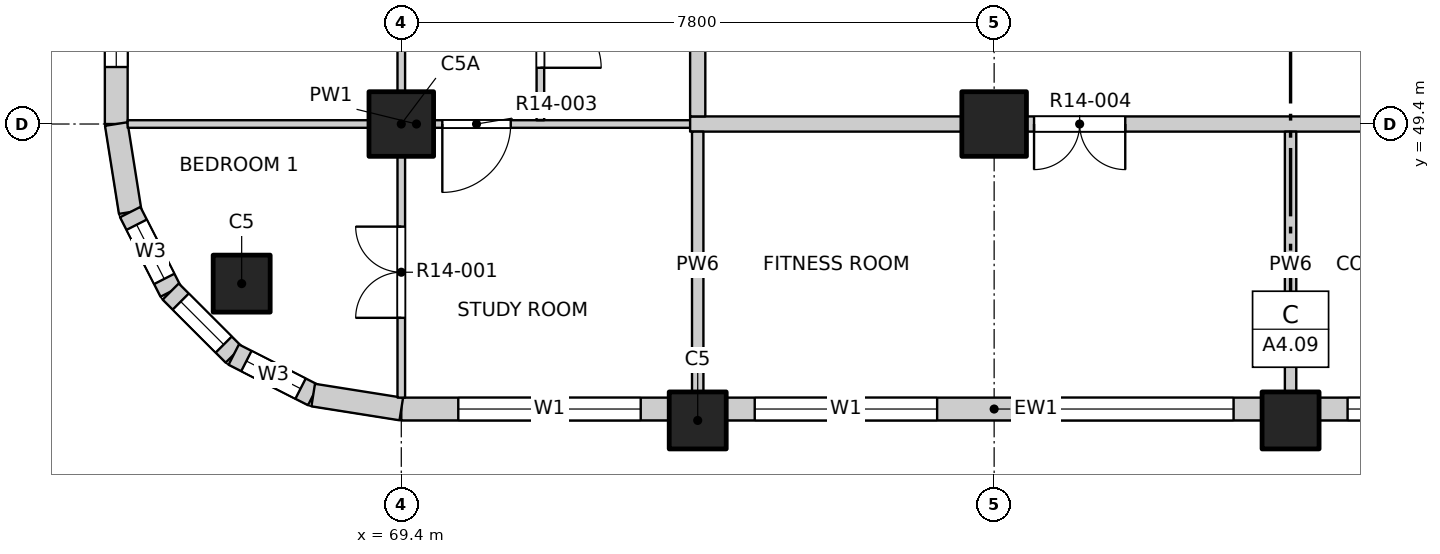
"""IFC4 building model, lengths in metres.
Left out: names, types, materials, properties, quantities, classifications, styles, units other than length and angle.
Written with IfcOpenShell. Run it as: python <this file> out.ifc"""

import sys

from ifc_helpers import new_model, si_unit, direction, frame, frame_2d, origin, origin_2d, place, context, subcontext, project, spatial, rectangle, extrude, element, fill, save


model = new_model("IFC4")
c1 = context("Model", 3, precision=1e-05, world=origin(), true_north=direction((0.0, 1.0)))
c2 = subcontext(c1, "Body", "Model", "MODEL_VIEW")
j1 = project(units=[si_unit("LENGTHUNIT", "METRE"), si_unit("PLANEANGLEUNIT", "RADIAN")], contexts=[c1])
p1 = place(None, origin())
s1 = spatial("IfcSite", under=j1, at=p1, CompositionType="ELEMENT")
p2 = place(p1, origin())
s2 = spatial("IfcBuilding", under=s1, at=p2, CompositionType="ELEMENT")
p3 = place(p2, frame((0.0, 0.0, 152.0)))
s3 = spatial("IfcBuildingStorey", under=s2, at=p3, CompositionType="ELEMENT", Elevation=152.0)
for number, where, z_axis, x_axis in (
    (1, (67.3, 47.3, -0.25), (0.0, 0.0, 1.0), (1.0, 0.0, 0.0)),
    (2, (73.3, 45.5, -0.25), (0.0, 0.0, 1.0), (1.0, 0.0, 0.0)),
    (3, (81.1, 45.5, -0.25), (0.0, 0.0, 1.0), (1.0, 0.0, 0.0)),
):
    element("IfcColumn", number, at=place(p3, frame(where, z_axis=z_axis, x_axis=x_axis)), inside=s3, PredefinedType="COLUMN", context=c2, shape_type="SweptSolid", body=[
        extrude(rectangle(XDim=0.75, YDim=0.75, at=origin_2d()), origin(), (0.0, 0.0, 1.0), 3.4),
    ])
for number, where, z_axis, x_axis in (
    (4, (69.4, 49.4, -0.25), (0.0, 0.0, 1.0), (1.0, 0.0, 0.0)),
    (5, (77.2, 49.4, -0.25), (0.0, 0.0, 1.0), (1.0, 0.0, 0.0)),
):
    element("IfcColumn", number, at=place(p3, frame(where, z_axis=z_axis, x_axis=x_axis)), inside=s3, PredefinedType="COLUMN", context=c2, shape_type="SweptSolid", body=[
        extrude(rectangle(XDim=0.85, YDim=0.85, at=origin_2d()), origin(), (0.0, 0.0, 1.0), 3.4),
    ])
p4 = place(p3, frame((69.4, 45.65, 0.0), z_axis=(0.0, 0.0, 1.0), x_axis=(1.0, 0.0, 0.0)))
e6 = element("IfcWall", 6, at=p4, inside=s3, PredefinedType="SOLIDWALL", context=c2, shape_type="SweptSolid", body=[
    extrude(rectangle(XDim=3.525, YDim=0.3, at=frame_2d((1.763, 0.0))), origin(), (0.0, 0.0, 1.0), 2.7),
])
p5 = place(p4, frame((0.75, 0.0, 0.9)))
e7 = element("IfcOpeningElement", 7, at=p5, cuts=e6, PredefinedType="OPENING", context=c2, shape_type="SweptSolid", body=[
    extrude(rectangle(XDim=2.4, YDim=1.8, at=frame_2d((1.2, 0.9))), frame((0.0, 0.16, 0.0), z_axis=(0.0, -1.0, 0.0), x_axis=(1.0, 0.0, 0.0)), (0.0, 0.0, 1.0), 0.32),
])
p6 = place(p3, frame((73.675, 45.65, 0.0), z_axis=(0.0, 0.0, 1.0), x_axis=(1.0, 0.0, 0.0)))
e8 = element("IfcWall", 8, at=p6, inside=s3, PredefinedType="SOLIDWALL", context=c2, shape_type="SweptSolid", body=[
    extrude(rectangle(XDim=7.05, YDim=0.3, at=frame_2d((3.525, 0.0))), origin(), (0.0, 0.0, 1.0), 2.7),
])
p7 = place(p6, frame((0.375, 0.0, 0.9)))
e9 = element("IfcOpeningElement", 9, at=p7, cuts=e8, PredefinedType="OPENING", context=c2, shape_type="SweptSolid", body=[
    extrude(rectangle(XDim=2.4, YDim=1.8, at=frame_2d((1.2, 0.9))), frame((0.0, 0.16, 0.0), z_axis=(0.0, -1.0, 0.0), x_axis=(1.0, 0.0, 0.0)), (0.0, 0.0, 1.0), 0.32),
])
p8 = place(p6, frame((4.275, 0.0, 0.9)))
e10 = element("IfcOpeningElement", 10, at=p8, cuts=e8, PredefinedType="OPENING", context=c2, shape_type="SweptSolid", body=[
    extrude(rectangle(XDim=2.4, YDim=1.8, at=frame_2d((1.2, 0.9))), frame((0.0, 0.16, 0.0), z_axis=(0.0, -1.0, 0.0), x_axis=(1.0, 0.0, 0.0)), (0.0, 0.0, 1.0), 0.32),
])
p9 = place(p3, frame((81.475, 45.65, 0.0), z_axis=(0.0, 0.0, 1.0), x_axis=(1.0, 0.0, 0.0)))
e11 = element("IfcWall", 11, at=p9, inside=s3, PredefinedType="SOLIDWALL", context=c2, shape_type="SweptSolid", body=[
    extrude(rectangle(XDim=7.05, YDim=0.3, at=frame_2d((3.525, 0.0))), origin(), (0.0, 0.0, 1.0), 2.7),
])
p10 = place(p9, frame((0.375, 0.0, 0.9)))
e12 = element("IfcOpeningElement", 12, at=p10, cuts=e11, PredefinedType="OPENING", context=c2, shape_type="SweptSolid", body=[
    extrude(rectangle(XDim=2.4, YDim=1.8, at=frame_2d((1.2, 0.9))), frame((0.0, 0.16, 0.0), z_axis=(0.0, -1.0, 0.0), x_axis=(1.0, 0.0, 0.0)), (0.0, 0.0, 1.0), 0.32),
])
p11 = place(p9, frame((4.275, 0.0, 0.9)))
e13 = element("IfcOpeningElement", 13, at=p11, cuts=e11, PredefinedType="OPENING", context=c2, shape_type="SweptSolid", body=[
    extrude(rectangle(XDim=2.4, YDim=1.8, at=frame_2d((1.2, 0.9))), frame((0.0, 0.16, 0.0), z_axis=(0.0, -1.0, 0.0), x_axis=(1.0, 0.0, 0.0)), (0.0, 0.0, 1.0), 0.32),
])
p12 = place(p3, frame((65.65, 49.4, 0.0), z_axis=(0.0, 0.0, 1.0), x_axis=(0.0, 1.0, 0.0)))
e14 = element("IfcWall", 14, at=p12, inside=s3, PredefinedType="SOLIDWALL", context=c2, shape_type="SweptSolid", body=[
    extrude(rectangle(XDim=3.525, YDim=0.3, at=frame_2d((1.763, 0.0))), origin(), (0.0, 0.0, 1.0), 2.7),
])
p13 = place(p12, frame((0.75, 0.0, 0.9)))
e15 = element("IfcOpeningElement", 15, at=p13, cuts=e14, PredefinedType="OPENING", context=c2, shape_type="SweptSolid", body=[
    extrude(rectangle(XDim=2.4, YDim=1.8, at=frame_2d((1.2, 0.9))), frame((0.0, 0.16, 0.0), z_axis=(0.0, -1.0, 0.0), x_axis=(1.0, 0.0, 0.0)), (0.0, 0.0, 1.0), 0.32),
])
p14 = place(p3, frame((65.65, 49.4, 0.0), z_axis=(0.0, 0.0, 1.0), x_axis=(0.156496880861, -0.987678452879, 0.0)))
e16 = element("IfcWall", 16, at=p14, inside=s3, PredefinedType="SOLIDWALL", context=c2, shape_type="SweptSolid", body=[
    extrude(rectangle(XDim=1.173, YDim=0.3, at=frame_2d((0.586, 0.0))), origin(), (0.0, 0.0, 1.0), 2.7),
])
p15 = place(p3, frame((65.833, 48.241, 0.0), z_axis=(0.0, 0.0, 1.0), x_axis=(0.454025524128, -0.890988677504, 0.0)))
e17 = element("IfcWall", 17, at=p15, inside=s3, PredefinedType="SOLIDWALL", context=c2, shape_type="SweptSolid", body=[
    extrude(rectangle(XDim=1.173, YDim=0.3, at=frame_2d((0.587, 0.0))), origin(), (0.0, 0.0, 1.0), 2.7),
])
p16 = place(p15, frame((0.187, 0.0, 0.9)))
e18 = element("IfcOpeningElement", 18, at=p16, cuts=e17, PredefinedType="OPENING", context=c2, shape_type="SweptSolid", body=[
    extrude(rectangle(XDim=0.8, YDim=1.2, at=frame_2d((0.4, 0.6))), frame((0.0, 0.16, 0.0), z_axis=(0.0, -1.0, 0.0), x_axis=(1.0, 0.0, 0.0)), (0.0, 0.0, 1.0), 0.32),
])
p17 = place(p3, frame((66.366, 47.196, 0.0), z_axis=(0.0, 0.0, 1.0), x_axis=(0.707106781187, -0.707106781187, 0.0)))
e19 = element("IfcWall", 19, at=p17, inside=s3, PredefinedType="SOLIDWALL", context=c2, shape_type="SweptSolid", body=[
    extrude(rectangle(XDim=1.173, YDim=0.3, at=frame_2d((0.586, 0.0))), origin(), (0.0, 0.0, 1.0), 2.7),
])
p18 = place(p17, frame((0.187, 0.0, 0.9)))
e20 = element("IfcOpeningElement", 20, at=p18, cuts=e19, PredefinedType="OPENING", context=c2, shape_type="SweptSolid", body=[
    extrude(rectangle(XDim=0.8, YDim=1.2, at=frame_2d((0.4, 0.6))), frame((0.0, 0.16, 0.0), z_axis=(0.0, -1.0, 0.0), x_axis=(1.0, 0.0, 0.0)), (0.0, 0.0, 1.0), 0.32),
])
p19 = place(p3, frame((67.196, 46.366, 0.0), z_axis=(0.0, 0.0, 1.0), x_axis=(0.890988677504, -0.454025524128, 0.0)))
e21 = element("IfcWall", 21, at=p19, inside=s3, PredefinedType="SOLIDWALL", context=c2, shape_type="SweptSolid", body=[
    extrude(rectangle(XDim=1.173, YDim=0.3, at=frame_2d((0.587, 0.0))), origin(), (0.0, 0.0, 1.0), 2.7),
])
p20 = place(p19, frame((0.187, 0.0, 0.9)))
e22 = element("IfcOpeningElement", 22, at=p20, cuts=e21, PredefinedType="OPENING", context=c2, shape_type="SweptSolid", body=[
    extrude(rectangle(XDim=0.8, YDim=1.2, at=frame_2d((0.4, 0.6))), frame((0.0, 0.16, 0.0), z_axis=(0.0, -1.0, 0.0), x_axis=(1.0, 0.0, 0.0)), (0.0, 0.0, 1.0), 0.32),
])
p21 = place(p3, frame((68.241, 45.833, 0.0), z_axis=(0.0, 0.0, 1.0), x_axis=(0.987678452879, -0.156496880861, 0.0)))
e23 = element("IfcWall", 23, at=p21, inside=s3, PredefinedType="SOLIDWALL", context=c2, shape_type="SweptSolid", body=[
    extrude(rectangle(XDim=1.173, YDim=0.3, at=frame_2d((0.586, 0.0))), origin(), (0.0, 0.0, 1.0), 2.7),
])
p22 = place(p3, frame((65.8, 49.4, 0.0), z_axis=(0.0, 0.0, 1.0), x_axis=(1.0, 0.0, 0.0)))
e24 = element("IfcWall", 24, at=p22, inside=s3, PredefinedType="PARTITIONING", context=c2, shape_type="SweptSolid", body=[
    extrude(rectangle(XDim=7.6, YDim=0.1, at=frame_2d((3.8, 0.0))), origin(), (0.0, 0.0, 1.0), 3.15),
])
p23 = place(p22, frame((4.14, 0.0, 0.0)))
e25 = element("IfcOpeningElement", 25, at=p23, cuts=e24, PredefinedType="OPENING", context=c2, shape_type="SweptSolid", body=[
    extrude(rectangle(XDim=0.9, YDim=2.1, at=frame_2d((0.45, 1.05))), frame((0.0, 0.06, 0.0), z_axis=(0.0, -1.0, 0.0), x_axis=(1.0, 0.0, 0.0)), (0.0, 0.0, 1.0), 0.12),
])
p24 = place(p3, frame((73.2, 49.4, 0.0), z_axis=(0.0, 0.0, 1.0), x_axis=(1.0, 0.0, 0.0)))
e26 = element("IfcWall", 26, at=p24, inside=s3, PredefinedType="PARTITIONING", context=c2, shape_type="SweptSolid", body=[
    extrude(rectangle(XDim=23.6, YDim=0.2, at=frame_2d((11.8, 0.0))), origin(), (0.0, 0.0, 1.0), 3.15),
])
p25 = place(p24, frame((4.525, 0.0, 0.0)))
e27 = element("IfcOpeningElement", 27, at=p25, cuts=e26, PredefinedType="OPENING", context=c2, shape_type="SweptSolid", body=[
    extrude(rectangle(XDim=1.2, YDim=2.1, at=frame_2d((0.6, 1.05))), frame((0.0, 0.11, 0.0), z_axis=(0.0, -1.0, 0.0), x_axis=(1.0, 0.0, 0.0)), (0.0, 0.0, 1.0), 0.22),
])
p26 = place(p24, frame((12.325, 0.0, 0.0)))
e28 = element("IfcOpeningElement", 28, at=p26, cuts=e26, PredefinedType="OPENING", context=c2, shape_type="SweptSolid", body=[
    extrude(rectangle(XDim=1.2, YDim=2.1, at=frame_2d((0.6, 1.05))), frame((0.0, 0.11, 0.0), z_axis=(0.0, -1.0, 0.0), x_axis=(1.0, 0.0, 0.0)), (0.0, 0.0, 1.0), 0.22),
])
p27 = place(p24, frame((20.125, 0.0, 0.0)))
e29 = element("IfcOpeningElement", 29, at=p27, cuts=e26, PredefinedType="OPENING", context=c2, shape_type="SweptSolid", body=[
    extrude(rectangle(XDim=1.2, YDim=2.1, at=frame_2d((0.6, 1.05))), frame((0.0, 0.11, 0.0), z_axis=(0.0, -1.0, 0.0), x_axis=(1.0, 0.0, 0.0)), (0.0, 0.0, 1.0), 0.22),
])
p28 = place(p3, frame((69.4, 45.8, 0.0), z_axis=(0.0, 0.0, 1.0), x_axis=(0.0, 1.0, 0.0)))
e30 = element("IfcWall", 30, at=p28, inside=s3, PredefinedType="PARTITIONING", context=c2, shape_type="SweptSolid", body=[
    extrude(rectangle(XDim=38.4, YDim=0.1, at=frame_2d((19.2, 0.0))), origin(), (0.0, 0.0, 1.0), 3.15),
])
p29 = place(p28, frame((1.05, 0.0, 0.0)))
e31 = element("IfcOpeningElement", 31, at=p29, cuts=e30, PredefinedType="OPENING", context=c2, shape_type="SweptSolid", body=[
    extrude(rectangle(XDim=1.2, YDim=2.1, at=frame_2d((0.6, 1.05))), frame((0.0, 0.06, 0.0), z_axis=(0.0, -1.0, 0.0), x_axis=(1.0, 0.0, 0.0)), (0.0, 0.0, 1.0), 0.12),
])
p30 = place(p28, frame((6.9, 0.0, 0.0)))
e32 = element("IfcOpeningElement", 32, at=p30, cuts=e30, PredefinedType="OPENING", context=c2, shape_type="SweptSolid", body=[
    extrude(rectangle(XDim=1.2, YDim=2.1, at=frame_2d((0.6, 1.05))), frame((0.0, 0.06, 0.0), z_axis=(0.0, -1.0, 0.0), x_axis=(1.0, 0.0, 0.0)), (0.0, 0.0, 1.0), 0.12),
])
p31 = place(p28, frame((12.9, 0.0, 0.0)))
e33 = element("IfcOpeningElement", 33, at=p31, cuts=e30, PredefinedType="OPENING", context=c2, shape_type="SweptSolid", body=[
    extrude(rectangle(XDim=0.9, YDim=2.1, at=frame_2d((0.45, 1.05))), frame((0.0, 0.06, 0.0), z_axis=(0.0, -1.0, 0.0), x_axis=(1.0, 0.0, 0.0)), (0.0, 0.0, 1.0), 0.12),
])
p32 = place(p28, frame((16.8, 0.0, 0.0)))
e34 = element("IfcOpeningElement", 34, at=p32, cuts=e30, PredefinedType="OPENING", context=c2, shape_type="SweptSolid", body=[
    extrude(rectangle(XDim=0.9, YDim=2.1, at=frame_2d((0.45, 1.05))), frame((0.0, 0.06, 0.0), z_axis=(0.0, -1.0, 0.0), x_axis=(1.0, 0.0, 0.0)), (0.0, 0.0, 1.0), 0.12),
])
p33 = place(p28, frame((20.7, 0.0, 0.0)))
e35 = element("IfcOpeningElement", 35, at=p33, cuts=e30, PredefinedType="OPENING", context=c2, shape_type="SweptSolid", body=[
    extrude(rectangle(XDim=0.9, YDim=2.1, at=frame_2d((0.45, 1.05))), frame((0.0, 0.06, 0.0), z_axis=(0.0, -1.0, 0.0), x_axis=(1.0, 0.0, 0.0)), (0.0, 0.0, 1.0), 0.12),
])
p34 = place(p28, frame((24.6, 0.0, 0.0)))
e36 = element("IfcOpeningElement", 36, at=p34, cuts=e30, PredefinedType="OPENING", context=c2, shape_type="SweptSolid", body=[
    extrude(rectangle(XDim=0.9, YDim=2.1, at=frame_2d((0.45, 1.05))), frame((0.0, 0.06, 0.0), z_axis=(0.0, -1.0, 0.0), x_axis=(1.0, 0.0, 0.0)), (0.0, 0.0, 1.0), 0.12),
])
p35 = place(p28, frame((28.5, 0.0, 0.0)))
e37 = element("IfcOpeningElement", 37, at=p35, cuts=e30, PredefinedType="OPENING", context=c2, shape_type="SweptSolid", body=[
    extrude(rectangle(XDim=0.9, YDim=2.1, at=frame_2d((0.45, 1.05))), frame((0.0, 0.06, 0.0), z_axis=(0.0, -1.0, 0.0), x_axis=(1.0, 0.0, 0.0)), (0.0, 0.0, 1.0), 0.12),
])
p36 = place(p28, frame((32.4, 0.0, 0.0)))
e38 = element("IfcOpeningElement", 38, at=p36, cuts=e30, PredefinedType="OPENING", context=c2, shape_type="SweptSolid", body=[
    extrude(rectangle(XDim=0.9, YDim=2.1, at=frame_2d((0.45, 1.05))), frame((0.0, 0.06, 0.0), z_axis=(0.0, -1.0, 0.0), x_axis=(1.0, 0.0, 0.0)), (0.0, 0.0, 1.0), 0.12),
])
p37 = place(p28, frame((36.15, 0.0, 0.0)))
e39 = element("IfcOpeningElement", 39, at=p37, cuts=e30, PredefinedType="OPENING", context=c2, shape_type="SweptSolid", body=[
    extrude(rectangle(XDim=1.2, YDim=2.1, at=frame_2d((0.6, 1.05))), frame((0.0, 0.06, 0.0), z_axis=(0.0, -1.0, 0.0), x_axis=(1.0, 0.0, 0.0)), (0.0, 0.0, 1.0), 0.12),
])
p38 = place(p3, frame((71.23, 49.45, 0.0), z_axis=(0.0, 0.0, 1.0), x_axis=(0.0, 1.0, 0.0)))
e40 = element("IfcWall", 40, at=p38, inside=s3, PredefinedType="PARTITIONING", context=c2, shape_type="SweptSolid", body=[
    extrude(rectangle(XDim=8.85, YDim=0.1, at=frame_2d((4.425, 0.0))), origin(), (0.0, 0.0, 1.0), 3.15),
])
p39 = place(p38, frame((0.69, 0.0, 0.0)))
e41 = element("IfcOpeningElement", 41, at=p39, cuts=e40, PredefinedType="OPENING", context=c2, shape_type="SweptSolid", body=[
    extrude(rectangle(XDim=0.8, YDim=2.1, at=frame_2d((0.4, 1.05))), frame((0.0, 0.06, 0.0), z_axis=(0.0, -1.0, 0.0), x_axis=(1.0, 0.0, 0.0)), (0.0, 0.0, 1.0), 0.12),
])
p40 = place(p38, frame((2.68, 0.0, 0.0)))
e42 = element("IfcOpeningElement", 42, at=p40, cuts=e40, PredefinedType="OPENING", context=c2, shape_type="SweptSolid", body=[
    extrude(rectangle(XDim=0.9, YDim=2.1, at=frame_2d((0.45, 1.05))), frame((0.0, 0.06, 0.0), z_axis=(0.0, -1.0, 0.0), x_axis=(1.0, 0.0, 0.0)), (0.0, 0.0, 1.0), 0.12),
])
p41 = place(p38, frame((4.965, 0.0, 0.0)))
e43 = element("IfcOpeningElement", 43, at=p41, cuts=e40, PredefinedType="OPENING", context=c2, shape_type="SweptSolid", body=[
    extrude(rectangle(XDim=0.9, YDim=2.1, at=frame_2d((0.45, 1.05))), frame((0.0, 0.06, 0.0), z_axis=(0.0, -1.0, 0.0), x_axis=(1.0, 0.0, 0.0)), (0.0, 0.0, 1.0), 0.12),
])
p42 = place(p38, frame((7.4, 0.0, 0.0)))
e44 = element("IfcOpeningElement", 44, at=p42, cuts=e40, PredefinedType="OPENING", context=c2, shape_type="SweptSolid", body=[
    extrude(rectangle(XDim=0.9, YDim=2.1, at=frame_2d((0.45, 1.05))), frame((0.0, 0.06, 0.0), z_axis=(0.0, -1.0, 0.0), x_axis=(1.0, 0.0, 0.0)), (0.0, 0.0, 1.0), 0.12),
])
p43 = place(p3, frame((73.3, 45.8, 0.0), z_axis=(0.0, 0.0, 1.0), x_axis=(0.0, 1.0, 0.0)))
e45 = element("IfcWall", 45, at=p43, inside=s3, PredefinedType="PARTITIONING", context=c2, shape_type="SweptSolid", body=[
    extrude(rectangle(XDim=3.5, YDim=0.15, at=frame_2d((1.75, 0.0))), origin(), (0.0, 0.0, 1.0), 3.15),
])
p44 = place(p3, frame((73.3, 49.5, 0.0), z_axis=(0.0, 0.0, 1.0), x_axis=(0.0, 1.0, 0.0)))
e46 = element("IfcWall", 46, at=p44, inside=s3, PredefinedType="PARTITIONING", context=c2, shape_type="SweptSolid", body=[
    extrude(rectangle(XDim=34.7, YDim=0.2, at=frame_2d((17.35, 0.0))), origin(), (0.0, 0.0, 1.0), 3.15),
])
p45 = place(p44, frame((10.125, 0.0, 0.0)))
e47 = element("IfcOpeningElement", 47, at=p45, cuts=e46, PredefinedType="OPENING", context=c2, shape_type="SweptSolid", body=[
    extrude(rectangle(XDim=1.0, YDim=2.1, at=frame_2d((0.5, 1.05))), frame((0.0, 0.11, 0.0), z_axis=(0.0, -1.0, 0.0), x_axis=(1.0, 0.0, 0.0)), (0.0, 0.0, 1.0), 0.22),
])
p46 = place(p44, frame((14.575, 0.0, 0.0)))
e48 = element("IfcOpeningElement", 48, at=p46, cuts=e46, PredefinedType="OPENING", context=c2, shape_type="SweptSolid", body=[
    extrude(rectangle(XDim=1.0, YDim=2.1, at=frame_2d((0.5, 1.05))), frame((0.0, 0.11, 0.0), z_axis=(0.0, -1.0, 0.0), x_axis=(1.0, 0.0, 0.0)), (0.0, 0.0, 1.0), 0.22),
])
p47 = place(p44, frame((26.575, 0.0, 0.0)))
e49 = element("IfcOpeningElement", 49, at=p47, cuts=e46, PredefinedType="OPENING", context=c2, shape_type="SweptSolid", body=[
    extrude(rectangle(XDim=1.0, YDim=2.1, at=frame_2d((0.5, 1.05))), frame((0.0, 0.11, 0.0), z_axis=(0.0, -1.0, 0.0), x_axis=(1.0, 0.0, 0.0)), (0.0, 0.0, 1.0), 0.22),
])
p48 = place(p3, frame((81.1, 45.8, 0.0), z_axis=(0.0, 0.0, 1.0), x_axis=(0.0, 1.0, 0.0)))
e50 = element("IfcWall", 50, at=p48, inside=s3, PredefinedType="PARTITIONING", context=c2, shape_type="SweptSolid", body=[
    extrude(rectangle(XDim=3.5, YDim=0.15, at=frame_2d((1.75, 0.0))), origin(), (0.0, 0.0, 1.0), 3.15),
])
p49 = place(p5, origin())
e51 = element("IfcWindow", 51, at=p49, inside=s3, PartitioningType="DOUBLE_PANEL_VERTICAL", PredefinedType="WINDOW", context=c2, shape_type="SweptSolid", body=[
    extrude(rectangle(XDim=2.4, YDim=1.8, at=frame_2d((1.2, 0.9))), frame((0.0, 0.03, 0.0), z_axis=(0.0, -1.0, 0.0), x_axis=(1.0, 0.0, 0.0)), (0.0, 0.0, 1.0), 0.06),
])
fill(e7, e51)
p50 = place(p7, origin())
e52 = element("IfcWindow", 52, at=p50, inside=s3, PartitioningType="DOUBLE_PANEL_VERTICAL", PredefinedType="WINDOW", context=c2, shape_type="SweptSolid", body=[
    extrude(rectangle(XDim=2.4, YDim=1.8, at=frame_2d((1.2, 0.9))), frame((0.0, 0.03, 0.0), z_axis=(0.0, -1.0, 0.0), x_axis=(1.0, 0.0, 0.0)), (0.0, 0.0, 1.0), 0.06),
])
fill(e9, e52)
p51 = place(p8, origin())
e53 = element("IfcWindow", 53, at=p51, inside=s3, PartitioningType="DOUBLE_PANEL_VERTICAL", PredefinedType="WINDOW", context=c2, shape_type="SweptSolid", body=[
    extrude(rectangle(XDim=2.4, YDim=1.8, at=frame_2d((1.2, 0.9))), frame((0.0, 0.03, 0.0), z_axis=(0.0, -1.0, 0.0), x_axis=(1.0, 0.0, 0.0)), (0.0, 0.0, 1.0), 0.06),
])
fill(e10, e53)
p52 = place(p10, origin())
e54 = element("IfcWindow", 54, at=p52, inside=s3, PartitioningType="DOUBLE_PANEL_VERTICAL", PredefinedType="WINDOW", context=c2, shape_type="SweptSolid", body=[
    extrude(rectangle(XDim=2.4, YDim=1.8, at=frame_2d((1.2, 0.9))), frame((0.0, 0.03, 0.0), z_axis=(0.0, -1.0, 0.0), x_axis=(1.0, 0.0, 0.0)), (0.0, 0.0, 1.0), 0.06),
])
fill(e12, e54)
p53 = place(p13, origin())
e55 = element("IfcWindow", 55, at=p53, inside=s3, PartitioningType="DOUBLE_PANEL_VERTICAL", PredefinedType="WINDOW", context=c2, shape_type="SweptSolid", body=[
    extrude(rectangle(XDim=2.4, YDim=1.8, at=frame_2d((1.2, 0.9))), frame((0.0, 0.03, 0.0), z_axis=(0.0, -1.0, 0.0), x_axis=(1.0, 0.0, 0.0)), (0.0, 0.0, 1.0), 0.06),
])
fill(e15, e55)
p54 = place(p16, origin())
e56 = element("IfcWindow", 56, at=p54, inside=s3, PartitioningType="SINGLE_PANEL", PredefinedType="WINDOW", context=c2, shape_type="SweptSolid", body=[
    extrude(rectangle(XDim=0.8, YDim=1.2, at=frame_2d((0.4, 0.6))), frame((0.0, 0.03, 0.0), z_axis=(0.0, -1.0, 0.0), x_axis=(1.0, 0.0, 0.0)), (0.0, 0.0, 1.0), 0.06),
])
fill(e18, e56)
p55 = place(p18, origin())
e57 = element("IfcWindow", 57, at=p55, inside=s3, PartitioningType="SINGLE_PANEL", PredefinedType="WINDOW", context=c2, shape_type="SweptSolid", body=[
    extrude(rectangle(XDim=0.8, YDim=1.2, at=frame_2d((0.4, 0.6))), frame((0.0, 0.03, 0.0), z_axis=(0.0, -1.0, 0.0), x_axis=(1.0, 0.0, 0.0)), (0.0, 0.0, 1.0), 0.06),
])
fill(e20, e57)
p56 = place(p20, origin())
e58 = element("IfcWindow", 58, at=p56, inside=s3, PartitioningType="SINGLE_PANEL", PredefinedType="WINDOW", context=c2, shape_type="SweptSolid", body=[
    extrude(rectangle(XDim=0.8, YDim=1.2, at=frame_2d((0.4, 0.6))), frame((0.0, 0.03, 0.0), z_axis=(0.0, -1.0, 0.0), x_axis=(1.0, 0.0, 0.0)), (0.0, 0.0, 1.0), 0.06),
])
fill(e22, e58)
p57 = place(p29, origin())
e59 = element("IfcDoor", 59, at=p57, inside=s3, OperationType="DOUBLE_DOOR_SINGLE_SWING", PredefinedType="DOOR", context=c2, shape_type="SweptSolid", body=[
    extrude(rectangle(XDim=1.2, YDim=2.1, at=frame_2d((0.6, 1.05))), frame((0.0, 0.025, 0.0), z_axis=(0.0, -1.0, 0.0), x_axis=(1.0, 0.0, 0.0)), (0.0, 0.0, 1.0), 0.05),
])
fill(e31, e59)
p58 = place(p23, origin())
e60 = element("IfcDoor", 60, at=p58, inside=s3, OperationType="SINGLE_SWING_RIGHT", PredefinedType="DOOR", context=c2, shape_type="SweptSolid", body=[
    extrude(rectangle(XDim=0.9, YDim=2.1, at=frame_2d((0.45, 1.05))), frame((0.0, 0.025, 0.0), z_axis=(0.0, -1.0, 0.0), x_axis=(1.0, 0.0, 0.0)), (0.0, 0.0, 1.0), 0.05),
])
fill(e25, e60)
p59 = place(p25, origin())
e61 = element("IfcDoor", 61, at=p59, inside=s3, OperationType="DOUBLE_DOOR_SINGLE_SWING", PredefinedType="DOOR", context=c2, shape_type="SweptSolid", body=[
    extrude(rectangle(XDim=1.2, YDim=2.1, at=frame_2d((0.6, 1.05))), frame((0.0, 0.025, 0.0), z_axis=(0.0, -1.0, 0.0), x_axis=(1.0, 0.0, 0.0)), (0.0, 0.0, 1.0), 0.05),
])
fill(e27, e61)
p60 = place(p39, origin())
e62 = element("IfcDoor", 62, at=p60, inside=s3, OperationType="SINGLE_SWING_RIGHT", PredefinedType="DOOR", context=c2, shape_type="SweptSolid", body=[
    extrude(rectangle(XDim=0.8, YDim=2.1, at=frame_2d((0.4, 1.05))), frame((0.0, 0.025, 0.0), z_axis=(0.0, -1.0, 0.0), x_axis=(1.0, 0.0, 0.0)), (0.0, 0.0, 1.0), 0.05),
])
fill(e41, e62)
save(model, sys.argv[1])
